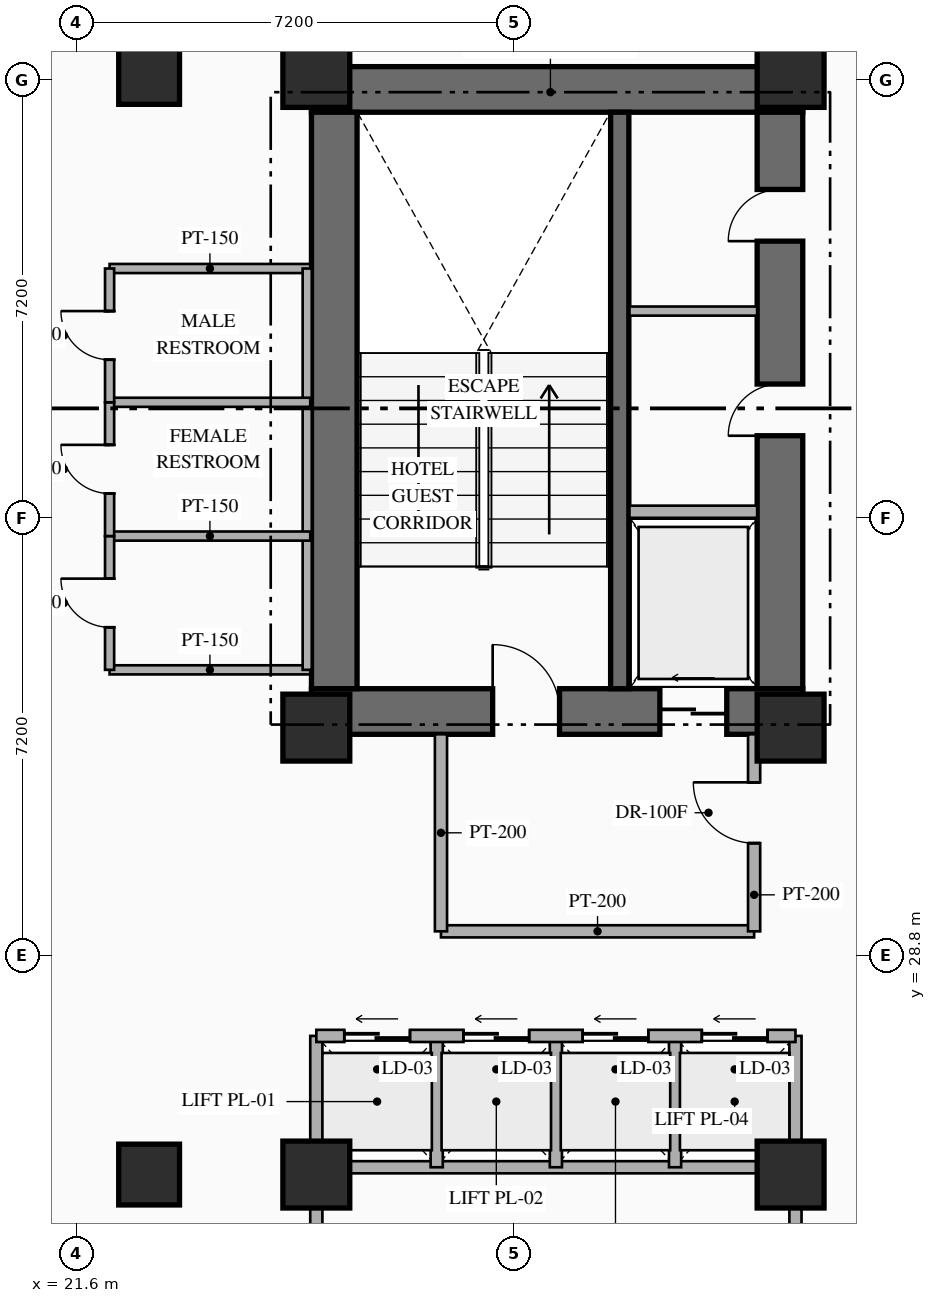
"""IFC4 building model, lengths in metres.
Left out: names, types, materials, properties, quantities, classifications, styles, units other than length and angle.
Written with IfcOpenShell. Run it as: python <this file> out.ifc"""

import sys

from ifc_helpers import new_model, si_unit, direction, frame, frame_2d, origin, origin_2d, place, context, subcontext, project, spatial, rectangle, hollow_rectangle, extrude, element, fill, save


model = new_model("IFC4")
c1 = context("Model", 3, precision=1e-05, world=origin(), true_north=direction((0.0, 1.0)))
c2 = subcontext(c1, "Body", "Model", "MODEL_VIEW")
j1 = project(units=[si_unit("LENGTHUNIT", "METRE"), si_unit("PLANEANGLEUNIT", "RADIAN")], contexts=[c1])
p1 = place(None, origin())
s1 = spatial("IfcSite", under=j1, at=p1, CompositionType="ELEMENT")
p2 = place(p1, origin())
s2 = spatial("IfcBuilding", under=s1, at=p2, CompositionType="ELEMENT")
p3 = place(p2, frame((0.0, 0.0, 36.6)))
s3 = spatial("IfcBuildingStorey", under=s2, at=p3, CompositionType="ELEMENT", Elevation=36.6)
p4 = place(p3, frame((25.47, 32.815, 0.0), z_axis=(0.0, 0.0, 1.0), x_axis=(1.0, 0.0, 0.0)))
e1 = element("IfcWall", 1, at=p4, inside=s3, PredefinedType="SHEAR", context=c2, shape_type="SweptSolid", body=[
    extrude(rectangle(XDim=8.08, YDim=0.75, at=frame_2d((4.04, 0.0))), origin(), (0.0, 0.0, 1.0), 3.35),
])
p5 = place(p4, frame((2.98, 0.0, 0.0)))
e2 = element("IfcOpeningElement", 2, at=p5, cuts=e1, PredefinedType="OPENING", context=c2, shape_type="SweptSolid", body=[
    extrude(rectangle(XDim=1.1, YDim=2.2, at=frame_2d((0.55, 1.1))), frame((0.0, 0.385, 0.0), z_axis=(0.0, -1.0, 0.0), x_axis=(1.0, 0.0, 0.0)), (0.0, 0.0, 1.0), 0.77),
])
p6 = place(p4, frame((5.73, 0.0, 0.0)))
e3 = element("IfcOpeningElement", 3, at=p6, cuts=e1, PredefinedType="OPENING", context=c2, shape_type="SweptSolid", body=[
    extrude(rectangle(XDim=1.1, YDim=2.15, at=frame_2d((0.55, 1.075))), frame((0.0, 0.385, 0.0), z_axis=(0.0, -1.0, 0.0), x_axis=(1.0, 0.0, 0.0)), (0.0, 0.0, 1.0), 0.77),
])
p7 = place(p3, frame((25.47, 43.045, 0.0), z_axis=(0.0, 0.0, 1.0), x_axis=(1.0, 0.0, 0.0)))
e4 = element("IfcWall", 4, at=p7, inside=s3, PredefinedType="SHEAR", context=c2, shape_type="SweptSolid", body=[
    extrude(rectangle(XDim=8.08, YDim=0.75, at=frame_2d((4.04, 0.0))), origin(), (0.0, 0.0, 1.0), 3.35),
])
p8 = place(p3, frame((25.845, 33.19, 0.0), z_axis=(0.0, 0.0, 1.0), x_axis=(0.0, 1.0, 0.0)))
e5 = element("IfcWall", 5, at=p8, inside=s3, PredefinedType="SHEAR", context=c2, shape_type="SweptSolid", body=[
    extrude(rectangle(XDim=9.48, YDim=0.75, at=frame_2d((4.74, 0.0))), origin(), (0.0, 0.0, 1.0), 3.35),
])
p9 = place(p3, frame((33.175, 33.19, 0.0), z_axis=(0.0, 0.0, 1.0), x_axis=(0.0, 1.0, 0.0)))
e6 = element("IfcWall", 6, at=p9, inside=s3, PredefinedType="SHEAR", context=c2, shape_type="SweptSolid", body=[
    extrude(rectangle(XDim=9.48, YDim=0.75, at=frame_2d((4.74, 0.0))), origin(), (0.0, 0.0, 1.0), 3.35),
])
p10 = place(p9, frame((4.16, 0.0, 0.0)))
e7 = element("IfcOpeningElement", 7, at=p10, cuts=e6, PredefinedType="OPENING", context=c2, shape_type="SweptSolid", body=[
    extrude(rectangle(XDim=0.85, YDim=2.08, at=frame_2d((0.425, 1.04))), frame((0.0, 0.385, 0.0), z_axis=(0.0, -1.0, 0.0), x_axis=(1.0, 0.0, 0.0)), (0.0, 0.0, 1.0), 0.77),
])
p11 = place(p9, frame((7.36, 0.0, 0.0)))
e8 = element("IfcOpeningElement", 8, at=p11, cuts=e6, PredefinedType="OPENING", context=c2, shape_type="SweptSolid", body=[
    extrude(rectangle(XDim=0.85, YDim=2.08, at=frame_2d((0.425, 1.04))), frame((0.0, 0.385, 0.0), z_axis=(0.0, -1.0, 0.0), x_axis=(1.0, 0.0, 0.0)), (0.0, 0.0, 1.0), 0.77),
])
p12 = place(p3, frame((30.54, 33.19, 0.0), z_axis=(0.0, 0.0, 1.0), x_axis=(0.0, 1.0, 0.0)))
e9 = element("IfcWall", 9, at=p12, inside=s3, PredefinedType="SHEAR", context=c2, shape_type="SweptSolid", body=[
    extrude(rectangle(XDim=9.48, YDim=0.3, at=frame_2d((4.74, 0.0))), origin(), (0.0, 0.0, 1.0), 3.35),
])
for number, where, z_axis, x_axis in (
    (10, (25.55, 32.55, 0.0), (0.0, 0.0, 1.0), (1.0, 0.0, 0.0)),
    (11, (33.35, 32.55, 0.0), (0.0, 0.0, 1.0), (1.0, 0.0, 0.0)),
    (12, (25.55, 43.3, 0.0), (0.0, 0.0, 1.0), (1.0, 0.0, 0.0)),
    (13, (33.35, 43.3, 0.0), (0.0, 0.0, 1.0), (1.0, 0.0, 0.0)),
):
    element("IfcColumn", number, at=place(p3, frame(where, z_axis=z_axis, x_axis=x_axis)), inside=s3, PredefinedType="COLUMN", context=c2, shape_type="SweptSolid", body=[
        extrude(rectangle(XDim=1.1, YDim=1.1, at=origin_2d()), origin(), (0.0, 0.0, 1.0), 3.35),
    ])
for number, where, z_axis, x_axis in (
    (14, (25.55, 25.2, 0.0), (0.0, 0.0, 1.0), (1.0, 0.0, 0.0)),
    (15, (33.35, 25.2, 0.0), (0.0, 0.0, 1.0), (1.0, 0.0, 0.0)),
):
    element("IfcColumn", number, at=place(p3, frame(where, z_axis=z_axis, x_axis=x_axis)), inside=s3, PredefinedType="COLUMN", context=c2, shape_type="SweptSolid", body=[
        extrude(hollow_rectangle(XDim=1.1, YDim=1.1, WallThickness=0.04, at=origin_2d()), origin(), (0.0, 0.0, 1.0), 3.35),
    ])
for number, where, z_axis, x_axis in (
    (16, (22.8, 25.2, 0.0), (0.0, 0.0, 1.0), (1.0, 0.0, 0.0)),
    (17, (22.8, 43.3, 0.0), (0.0, 0.0, 1.0), (1.0, 0.0, 0.0)),
):
    element("IfcColumn", number, at=place(p3, frame(where, z_axis=z_axis, x_axis=x_axis)), inside=s3, PredefinedType="COLUMN", context=c2, shape_type="SweptSolid", body=[
        extrude(hollow_rectangle(XDim=1.0, YDim=1.0, WallThickness=0.038, at=origin_2d()), origin(), (0.0, 0.0, 1.0), 3.35),
    ])
p13 = place(p3, frame((30.7, 36.1, 0.0), z_axis=(0.0, 0.0, 1.0), x_axis=(1.0, 0.0, 0.0)))
e18 = element("IfcWall", 18, at=p13, inside=s3, PredefinedType="STANDARD", context=c2, shape_type="SweptSolid", body=[
    extrude(rectangle(XDim=2.1, YDim=0.2, at=frame_2d((1.05, 0.0))), origin(), (0.0, 0.0, 1.0), 3.13),
])
p14 = place(p3, frame((30.7, 39.4, 0.0), z_axis=(0.0, 0.0, 1.0), x_axis=(1.0, 0.0, 0.0)))
e19 = element("IfcWall", 19, at=p14, inside=s3, PredefinedType="PARTITIONING", context=c2, shape_type="SweptSolid", body=[
    extrude(rectangle(XDim=2.1, YDim=0.15, at=frame_2d((1.05, 0.0))), origin(), (0.0, 0.0, 1.0), 3.13),
])
p15 = place(p3, frame((27.6, 29.2, 0.0), z_axis=(0.0, 0.0, 1.0), x_axis=(1.0, 0.0, 0.0)))
e20 = element("IfcWall", 20, at=p15, inside=s3, PredefinedType="STANDARD", context=c2, shape_type="SweptSolid", body=[
    extrude(rectangle(XDim=5.15, YDim=0.2, at=frame_2d((2.575, 0.0))), origin(), (0.0, 0.0, 1.0), 3.13),
])
p16 = place(p3, frame((27.6, 29.2, 0.0), z_axis=(0.0, 0.0, 1.0), x_axis=(0.0, 1.0, 0.0)))
e21 = element("IfcWall", 21, at=p16, inside=s3, PredefinedType="STANDARD", context=c2, shape_type="SweptSolid", body=[
    extrude(rectangle(XDim=3.24, YDim=0.2, at=frame_2d((1.62, 0.0))), origin(), (0.0, 0.0, 1.0), 3.13),
])
p17 = place(p3, frame((32.75, 29.2, 0.0), z_axis=(0.0, 0.0, 1.0), x_axis=(0.0, 1.0, 0.0)))
e22 = element("IfcWall", 22, at=p17, inside=s3, PredefinedType="STANDARD", context=c2, shape_type="SweptSolid", body=[
    extrude(rectangle(XDim=3.24, YDim=0.2, at=frame_2d((1.62, 0.0))), origin(), (0.0, 0.0, 1.0), 3.13),
])
p18 = place(p17, frame((1.45, 0.0, 0.0)))
e23 = element("IfcOpeningElement", 23, at=p18, cuts=e22, PredefinedType="OPENING", context=c2, shape_type="SweptSolid", body=[
    extrude(rectangle(XDim=1.0, YDim=2.2, at=frame_2d((0.5, 1.1))), frame((0.0, 0.11, 0.0), z_axis=(0.0, -1.0, 0.0), x_axis=(1.0, 0.0, 0.0)), (0.0, 0.0, 1.0), 0.22),
])
for number, where, z_axis, x_axis in (
    (24, (25.55, 23.4, 0.0), (0.0, 0.0, 1.0), (0.0, 1.0, 0.0)),
    (25, (33.43, 23.4, 0.0), (0.0, 0.0, 1.0), (0.0, 1.0, 0.0)),
):
    element("IfcWall", number, at=place(p3, frame(where, z_axis=z_axis, x_axis=x_axis)), inside=s3, PredefinedType="STANDARD", context=c2, shape_type="SweptSolid", body=[
        extrude(rectangle(XDim=4.08, YDim=0.2, at=frame_2d((2.04, 0.0))), origin(), (0.0, 0.0, 1.0), 2.425),
    ])
p19 = place(p3, frame((25.55, 25.32, 0.0), z_axis=(0.0, 0.0, 1.0), x_axis=(1.0, 0.0, 0.0)))
e26 = element("IfcWall", 26, at=p19, inside=s3, PredefinedType="STANDARD", context=c2, shape_type="SweptSolid", body=[
    extrude(rectangle(XDim=7.88, YDim=0.2, at=frame_2d((3.94, 0.0))), origin(), (0.0, 0.0, 1.0), 2.525),
])
for number, where, z_axis, x_axis in (
    (27, (27.53, 25.32, 0.0), (0.0, 0.0, 1.0), (0.0, 1.0, 0.0)),
    (28, (29.49, 25.32, 0.0), (0.0, 0.0, 1.0), (0.0, 1.0, 0.0)),
    (29, (31.45, 25.32, 0.0), (0.0, 0.0, 1.0), (0.0, 1.0, 0.0)),
):
    element("IfcWall", number, at=place(p3, frame(where, z_axis=z_axis, x_axis=x_axis)), inside=s3, PredefinedType="STANDARD", context=c2, shape_type="SweptSolid", body=[
        extrude(rectangle(XDim=2.16, YDim=0.2, at=frame_2d((1.08, 0.0))), origin(), (0.0, 0.0, 1.0), 3.13),
    ])
p20 = place(p3, frame((25.55, 27.48, 0.0), z_axis=(0.0, 0.0, 1.0), x_axis=(1.0, 0.0, 0.0)))
e30 = element("IfcWall", 30, at=p20, inside=s3, PredefinedType="STANDARD", context=c2, shape_type="SweptSolid", body=[
    extrude(rectangle(XDim=7.88, YDim=0.2, at=frame_2d((3.94, 0.0))), origin(), (0.0, 0.0, 1.0), 3.13),
])
p21 = place(p20, frame((0.46, 0.0, 0.0)))
e31 = element("IfcOpeningElement", 31, at=p21, cuts=e30, PredefinedType="OPENING", context=c2, shape_type="SweptSolid", body=[
    extrude(rectangle(XDim=1.08, YDim=2.15, at=frame_2d((0.54, 1.075))), frame((0.0, 0.11, 0.0), z_axis=(0.0, -1.0, 0.0), x_axis=(1.0, 0.0, 0.0)), (0.0, 0.0, 1.0), 0.22),
])
p22 = place(p20, frame((2.42, 0.0, 0.0)))
e32 = element("IfcOpeningElement", 32, at=p22, cuts=e30, PredefinedType="OPENING", context=c2, shape_type="SweptSolid", body=[
    extrude(rectangle(XDim=1.08, YDim=2.15, at=frame_2d((0.54, 1.075))), frame((0.0, 0.11, 0.0), z_axis=(0.0, -1.0, 0.0), x_axis=(1.0, 0.0, 0.0)), (0.0, 0.0, 1.0), 0.22),
])
p23 = place(p20, frame((4.38, 0.0, 0.0)))
e33 = element("IfcOpeningElement", 33, at=p23, cuts=e30, PredefinedType="OPENING", context=c2, shape_type="SweptSolid", body=[
    extrude(rectangle(XDim=1.08, YDim=2.15, at=frame_2d((0.54, 1.075))), frame((0.0, 0.11, 0.0), z_axis=(0.0, -1.0, 0.0), x_axis=(1.0, 0.0, 0.0)), (0.0, 0.0, 1.0), 0.22),
])
p24 = place(p20, frame((6.34, 0.0, 0.0)))
e34 = element("IfcOpeningElement", 34, at=p24, cuts=e30, PredefinedType="OPENING", context=c2, shape_type="SweptSolid", body=[
    extrude(rectangle(XDim=1.08, YDim=2.15, at=frame_2d((0.54, 1.075))), frame((0.0, 0.11, 0.0), z_axis=(0.0, -1.0, 0.0), x_axis=(1.0, 0.0, 0.0)), (0.0, 0.0, 1.0), 0.22),
])
for number, where, z_axis, x_axis in (
    (35, (22.15, 33.5, 0.0), (0.0, 0.0, 1.0), (1.0, 0.0, 0.0)),
    (36, (22.15, 40.1, 0.0), (0.0, 0.0, 1.0), (1.0, 0.0, 0.0)),
):
    element("IfcWall", number, at=place(p3, frame(where, z_axis=z_axis, x_axis=x_axis)), inside=s3, PredefinedType="PARTITIONING", context=c2, shape_type="SweptSolid", body=[
        extrude(rectangle(XDim=3.3, YDim=0.15, at=frame_2d((1.65, 0.0))), origin(), (0.0, 0.0, 1.0), 3.13),
    ])
p25 = place(p3, frame((25.4, 33.5, 0.0), z_axis=(0.0, 0.0, 1.0), x_axis=(0.0, 1.0, 0.0)))
e37 = element("IfcWall", 37, at=p25, inside=s3, PredefinedType="PARTITIONING", context=c2, shape_type="SweptSolid", body=[
    extrude(rectangle(XDim=6.6, YDim=0.15, at=frame_2d((3.3, 0.0))), origin(), (0.0, 0.0, 1.0), 3.13),
])
for number, where, z_axis, x_axis in (
    (38, (22.15, 35.7, 0.0), (0.0, 0.0, 1.0), (1.0, 0.0, 0.0)),
    (39, (22.15, 37.9, 0.0), (0.0, 0.0, 1.0), (1.0, 0.0, 0.0)),
):
    element("IfcWall", number, at=place(p3, frame(where, z_axis=z_axis, x_axis=x_axis)), inside=s3, PredefinedType="PARTITIONING", context=c2, shape_type="SweptSolid", body=[
        extrude(rectangle(XDim=3.3, YDim=0.15, at=frame_2d((1.65, 0.0))), origin(), (0.0, 0.0, 1.0), 3.13),
    ])
p26 = place(p3, frame((22.15, 33.5, 0.0), z_axis=(0.0, 0.0, 1.0), x_axis=(0.0, 1.0, 0.0)))
e40 = element("IfcWall", 40, at=p26, inside=s3, PredefinedType="PARTITIONING", context=c2, shape_type="SweptSolid", body=[
    extrude(rectangle(XDim=2.2, YDim=0.15, at=frame_2d((1.1, 0.0))), origin(), (0.0, 0.0, 1.0), 3.13),
])
p27 = place(p26, frame((0.7, 0.0, 0.0)))
e41 = element("IfcOpeningElement", 41, at=p27, cuts=e40, PredefinedType="OPENING", context=c2, shape_type="SweptSolid", body=[
    extrude(rectangle(XDim=0.8, YDim=2.06, at=frame_2d((0.4, 1.03))), frame((0.0, 0.085, 0.0), z_axis=(0.0, -1.0, 0.0), x_axis=(1.0, 0.0, 0.0)), (0.0, 0.0, 1.0), 0.17),
])
p28 = place(p3, frame((22.15, 35.7, 0.0), z_axis=(0.0, 0.0, 1.0), x_axis=(0.0, 1.0, 0.0)))
e42 = element("IfcWall", 42, at=p28, inside=s3, PredefinedType="PARTITIONING", context=c2, shape_type="SweptSolid", body=[
    extrude(rectangle(XDim=2.2, YDim=0.15, at=frame_2d((1.1, 0.0))), origin(), (0.0, 0.0, 1.0), 3.13),
])
p29 = place(p28, frame((0.7, 0.0, 0.0)))
e43 = element("IfcOpeningElement", 43, at=p29, cuts=e42, PredefinedType="OPENING", context=c2, shape_type="SweptSolid", body=[
    extrude(rectangle(XDim=0.8, YDim=2.06, at=frame_2d((0.4, 1.03))), frame((0.0, 0.085, 0.0), z_axis=(0.0, -1.0, 0.0), x_axis=(1.0, 0.0, 0.0)), (0.0, 0.0, 1.0), 0.17),
])
p30 = place(p3, frame((22.15, 37.9, 0.0), z_axis=(0.0, 0.0, 1.0), x_axis=(0.0, 1.0, 0.0)))
e44 = element("IfcWall", 44, at=p30, inside=s3, PredefinedType="PARTITIONING", context=c2, shape_type="SweptSolid", body=[
    extrude(rectangle(XDim=2.2, YDim=0.15, at=frame_2d((1.1, 0.0))), origin(), (0.0, 0.0, 1.0), 3.13),
])
p31 = place(p30, frame((0.7, 0.0, 0.0)))
e45 = element("IfcOpeningElement", 45, at=p31, cuts=e44, PredefinedType="OPENING", context=c2, shape_type="SweptSolid", body=[
    extrude(rectangle(XDim=0.8, YDim=2.06, at=frame_2d((0.4, 1.03))), frame((0.0, 0.085, 0.0), z_axis=(0.0, -1.0, 0.0), x_axis=(1.0, 0.0, 0.0)), (0.0, 0.0, 1.0), 0.17),
])
p32 = place(p3, frame((33.384, 17.312, 0.0), z_axis=(0.0, 0.0, 1.0), x_axis=(0.600008743659, 0.799993442181, 0.0)))
e46 = element("IfcWall", 46, at=p32, inside=s3, PredefinedType="PARTITIONING", context=c2, shape_type="SweptSolid", body=[
    extrude(rectangle(XDim=8.935, YDim=0.15, at=frame_2d((4.468, 0.0))), origin(), (0.0, 0.0, 1.0), 3.13),
])
p33 = place(p5, origin())
e47 = element("IfcDoor", 47, at=p33, inside=s3, OperationType="SINGLE_SWING_LEFT", PredefinedType="DOOR", context=c2, shape_type="SweptSolid", body=[
    extrude(rectangle(XDim=1.1, YDim=2.2, at=frame_2d((0.55, 1.1))), frame((0.0, 0.025, 0.0), z_axis=(0.0, -1.0, 0.0), x_axis=(1.0, 0.0, 0.0)), (0.0, 0.0, 1.0), 0.05),
])
fill(e2, e47)
p34 = place(p6, origin())
e48 = element("IfcDoor", 48, at=p34, inside=s3, OperationType="SLIDING_TO_LEFT", PredefinedType="USERDEFINED", context=c2, shape_type="SweptSolid", body=[
    extrude(rectangle(XDim=1.1, YDim=2.15, at=frame_2d((0.55, 1.075))), frame((0.0, 0.025, 0.0), z_axis=(0.0, -1.0, 0.0), x_axis=(1.0, 0.0, 0.0)), (0.0, 0.0, 1.0), 0.05),
])
fill(e3, e48)
p35 = place(p10, origin())
e49 = element("IfcDoor", 49, at=p35, inside=s3, OperationType="SINGLE_SWING_LEFT", PredefinedType="DOOR", context=c2, shape_type="SweptSolid", body=[
    extrude(rectangle(XDim=0.85, YDim=2.08, at=frame_2d((0.425, 1.04))), frame((0.0, 0.025, 0.0), z_axis=(0.0, -1.0, 0.0), x_axis=(1.0, 0.0, 0.0)), (0.0, 0.0, 1.0), 0.05),
])
fill(e7, e49)
p36 = place(p11, origin())
e50 = element("IfcDoor", 50, at=p36, inside=s3, OperationType="SINGLE_SWING_LEFT", PredefinedType="DOOR", context=c2, shape_type="SweptSolid", body=[
    extrude(rectangle(XDim=0.85, YDim=2.08, at=frame_2d((0.425, 1.04))), frame((0.0, 0.025, 0.0), z_axis=(0.0, -1.0, 0.0), x_axis=(1.0, 0.0, 0.0)), (0.0, 0.0, 1.0), 0.05),
])
fill(e8, e50)
p37 = place(p18, origin())
e51 = element("IfcDoor", 51, at=p37, inside=s3, OperationType="SINGLE_SWING_RIGHT", PredefinedType="DOOR", context=c2, shape_type="SweptSolid", body=[
    extrude(rectangle(XDim=1.0, YDim=2.2, at=frame_2d((0.5, 1.1))), frame((0.0, 0.025, 0.0), z_axis=(0.0, -1.0, 0.0), x_axis=(1.0, 0.0, 0.0)), (0.0, 0.0, 1.0), 0.05),
])
fill(e23, e51)
p38 = place(p21, origin())
e52 = element("IfcDoor", 52, at=p38, inside=s3, OperationType="SLIDING_TO_LEFT", PredefinedType="USERDEFINED", context=c2, shape_type="SweptSolid", body=[
    extrude(rectangle(XDim=1.08, YDim=2.15, at=frame_2d((0.54, 1.075))), frame((0.0, 0.025, 0.0), z_axis=(0.0, -1.0, 0.0), x_axis=(1.0, 0.0, 0.0)), (0.0, 0.0, 1.0), 0.05),
])
fill(e31, e52)
p39 = place(p22, origin())
e53 = element("IfcDoor", 53, at=p39, inside=s3, OperationType="SLIDING_TO_LEFT", PredefinedType="USERDEFINED", context=c2, shape_type="SweptSolid", body=[
    extrude(rectangle(XDim=1.08, YDim=2.15, at=frame_2d((0.54, 1.075))), frame((0.0, 0.025, 0.0), z_axis=(0.0, -1.0, 0.0), x_axis=(1.0, 0.0, 0.0)), (0.0, 0.0, 1.0), 0.05),
])
fill(e32, e53)
p40 = place(p23, origin())
e54 = element("IfcDoor", 54, at=p40, inside=s3, OperationType="SLIDING_TO_LEFT", PredefinedType="USERDEFINED", context=c2, shape_type="SweptSolid", body=[
    extrude(rectangle(XDim=1.08, YDim=2.15, at=frame_2d((0.54, 1.075))), frame((0.0, 0.025, 0.0), z_axis=(0.0, -1.0, 0.0), x_axis=(1.0, 0.0, 0.0)), (0.0, 0.0, 1.0), 0.05),
])
fill(e33, e54)
p41 = place(p24, origin())
e55 = element("IfcDoor", 55, at=p41, inside=s3, OperationType="SLIDING_TO_LEFT", PredefinedType="USERDEFINED", context=c2, shape_type="SweptSolid", body=[
    extrude(rectangle(XDim=1.08, YDim=2.15, at=frame_2d((0.54, 1.075))), frame((0.0, 0.025, 0.0), z_axis=(0.0, -1.0, 0.0), x_axis=(1.0, 0.0, 0.0)), (0.0, 0.0, 1.0), 0.05),
])
fill(e34, e55)
p42 = place(p27, origin())
e56 = element("IfcDoor", 56, at=p42, inside=s3, OperationType="SINGLE_SWING_RIGHT", PredefinedType="DOOR", context=c2, shape_type="SweptSolid", body=[
    extrude(rectangle(XDim=0.8, YDim=2.06, at=frame_2d((0.4, 1.03))), frame((0.0, 0.025, 0.0), z_axis=(0.0, -1.0, 0.0), x_axis=(1.0, 0.0, 0.0)), (0.0, 0.0, 1.0), 0.05),
])
fill(e41, e56)
p43 = place(p29, origin())
e57 = element("IfcDoor", 57, at=p43, inside=s3, OperationType="SINGLE_SWING_RIGHT", PredefinedType="DOOR", context=c2, shape_type="SweptSolid", body=[
    extrude(rectangle(XDim=0.8, YDim=2.06, at=frame_2d((0.4, 1.03))), frame((0.0, 0.025, 0.0), z_axis=(0.0, -1.0, 0.0), x_axis=(1.0, 0.0, 0.0)), (0.0, 0.0, 1.0), 0.05),
])
fill(e43, e57)
p44 = place(p31, origin())
e58 = element("IfcDoor", 58, at=p44, inside=s3, OperationType="SINGLE_SWING_RIGHT", PredefinedType="DOOR", context=c2, shape_type="SweptSolid", body=[
    extrude(rectangle(XDim=0.8, YDim=2.06, at=frame_2d((0.4, 1.03))), frame((0.0, 0.025, 0.0), z_axis=(0.0, -1.0, 0.0), x_axis=(1.0, 0.0, 0.0)), (0.0, 0.0, 1.0), 0.05),
])
fill(e45, e58)
save(model, sys.argv[1])
